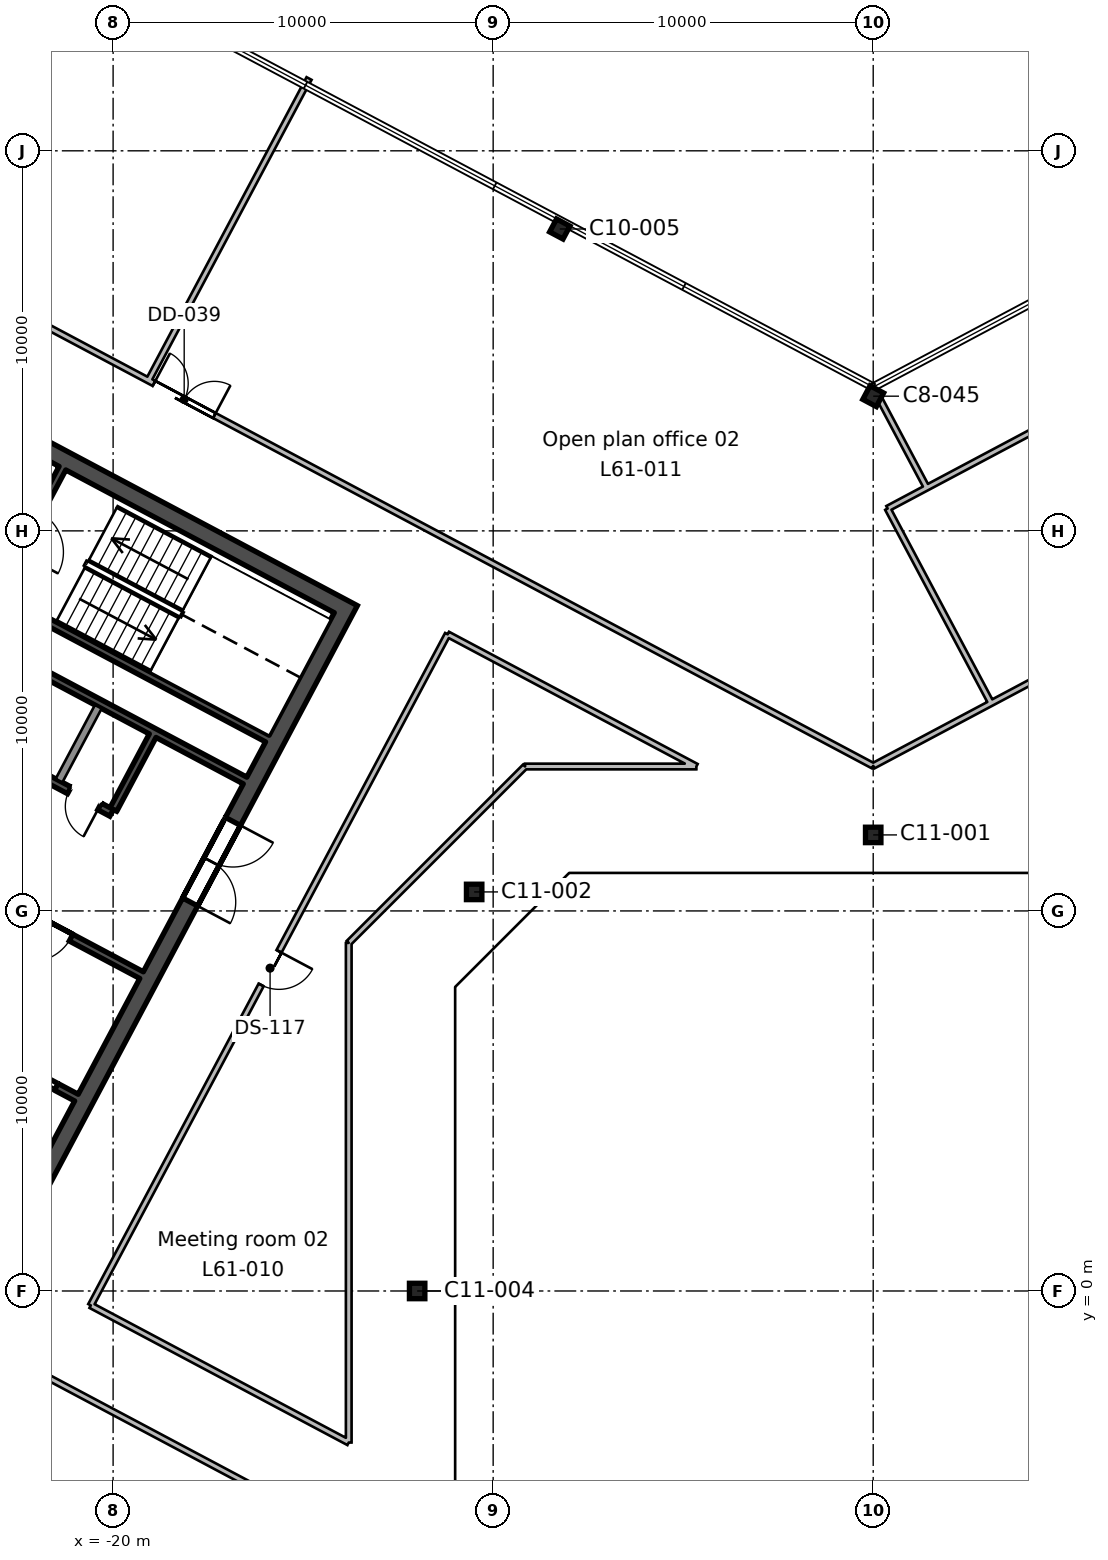
"""IFC4 building model, lengths in metres.
Left out: names, types, materials, properties, quantities, classifications, styles, units other than length and angle.
Written with IfcOpenShell. Run it as: python <this file> out.ifc"""

import sys

from ifc_helpers import new_model, si_unit, direction, frame, frame_2d, origin, origin_2d, place, context, subcontext, project, spatial, rectangle, hollow_rectangle, i_section, extrude, element, fill, save


model = new_model("IFC4")
c1 = context("Model", 3, precision=1e-05, world=origin(), true_north=direction((0.0, 1.0)))
c2 = subcontext(c1, "Body", "Model", "MODEL_VIEW")
j1 = project(units=[si_unit("LENGTHUNIT", "METRE"), si_unit("PLANEANGLEUNIT", "RADIAN")], contexts=[c1])
p1 = place(None, origin())
s1 = spatial("IfcSite", under=j1, at=p1, CompositionType="ELEMENT")
p2 = place(p1, origin())
s2 = spatial("IfcBuilding", under=s1, at=p2, CompositionType="ELEMENT")
p3 = place(p2, frame((0.0, 0.0, 273.6)))
s3 = spatial("IfcBuildingStorey", under=s2, at=p3, CompositionType="ELEMENT", Elevation=273.6)
for number, where, z_axis, x_axis in (
    (1, (-12.0, 0.0, 0.0), (0.0, 0.0, 1.0), (1.0, 0.0, 0.0)),
    (2, (-10.5, 10.5, 0.0), (0.0, 0.0, 1.0), (1.0, 0.0, 0.0)),
    (3, (0.0, 12.0, 0.0), (0.0, 0.0, 1.0), (1.0, 0.0, 0.0)),
):
    element("IfcColumn", number, at=place(p3, frame(where, z_axis=z_axis, x_axis=x_axis)), inside=s3, PredefinedType="COLUMN", context=c2, shape_type="SweptSolid", body=[
        extrude(hollow_rectangle(XDim=0.406, YDim=0.406, WallThickness=0.009, InnerFilletRadius=0.004, OuterFilletRadius=0.013, at=origin_2d()), origin(), (0.0, 0.0, 1.0), 3.9),
    ])
p4 = place(p3, frame((0.0, 23.544, 0.0), z_axis=(0.0, 0.0, 1.0), x_axis=(-0.882947592859, 0.469471562786, 0.0)))
e4 = element("IfcColumn", 4, at=p4, inside=s3, PredefinedType="COLUMN", context=c2, shape_type="SweptSolid", body=[
    extrude(i_section(OverallWidth=0.404, OverallDepth=0.406, WebThickness=0.027, FlangeThickness=0.044, FilletRadius=0.015, at=origin_2d()), origin(), (0.0, 0.0, 1.0), 3.9),
])
p5 = place(p3, frame((-8.247, 27.943, 0.0), z_axis=(0.0, 0.0, 1.0), x_axis=(-0.882947592859, 0.469471562786, 0.0)))
e5 = element("IfcColumn", 5, at=p5, inside=s3, PredefinedType="COLUMN", context=c2, shape_type="SweptSolid", body=[
    extrude(i_section(OverallWidth=0.399, OverallDepth=0.386, WebThickness=0.021, FlangeThickness=0.033, FilletRadius=0.015, at=origin_2d()), origin(), (0.0, 0.0, 1.0), 3.9),
])
p6 = place(p3, frame((-13.771, 18.138, 0.0), z_axis=(0.0, 0.0, 1.0), x_axis=(-0.469467968382, -0.882949504028, 0.0)))
e6 = element("IfcWall", 6, at=p6, inside=s3, PredefinedType="SHEAR", context=c2, shape_type="SweptSolid", body=[
    extrude(rectangle(XDim=19.1, YDim=0.45, at=frame_2d((9.55, 0.0))), origin(), (0.0, 0.0, 1.0), 3.9),
])
p7 = place(p6, frame((6.55, 0.0, 0.0)))
e7 = element("IfcOpeningElement", 7, at=p7, cuts=e6, PredefinedType="OPENING", context=c2, shape_type="SweptSolid", body=[
    extrude(rectangle(XDim=2.4, YDim=2.4, at=frame_2d((1.2, 1.2))), frame((0.0, 0.235, 0.0), z_axis=(0.0, -1.0, 0.0), x_axis=(1.0, 0.0, 0.0)), (0.0, 0.0, 1.0), 0.47),
])
p8 = place(p3, frame((-14.076, 18.045, 0.0), z_axis=(0.0, 0.0, 1.0), x_axis=(-0.882947755831, 0.46947125628, 0.0)))
e8 = element("IfcWall", 8, at=p8, inside=s3, PredefinedType="SHEAR", context=c2, shape_type="SweptSolid", body=[
    extrude(rectangle(XDim=20.2, YDim=0.45, at=frame_2d((10.1, 0.0))), origin(), (0.0, 0.0, 1.0), 3.9),
])
p9 = place(p3, frame((-18.96, 14.611, 0.0), z_axis=(0.0, 0.0, 1.0), x_axis=(-0.4694473164, -0.882960484464, 0.0)))
e9 = element("IfcWall", 9, at=p9, inside=s3, PredefinedType="SHEAR", context=c2, shape_type="SweptSolid", body=[
    extrude(rectangle(XDim=2.2, YDim=0.2, at=frame_2d((1.1, 0.0))), origin(), (0.0, 0.0, 1.0), 3.9),
])
p10 = place(p3, frame((-20.39, 15.372, 0.0), z_axis=(0.0, 0.0, 1.0), x_axis=(-0.4694473164, -0.882960484464, 0.0)))
e10 = element("IfcWall", 10, at=p10, inside=s3, PredefinedType="SOLIDWALL", context=c2, shape_type="SweptSolid", body=[
    extrude(rectangle(XDim=2.2, YDim=0.2, at=frame_2d((1.1, 0.0))), origin(), (0.0, 0.0, 1.0), 3.9),
])
p11 = place(p3, frame((-21.333, 21.649, 0.0), z_axis=(0.0, 0.0, 1.0), x_axis=(-0.469494272526, -0.882935517501, 0.0)))
e11 = element("IfcWall", 11, at=p11, inside=s3, PredefinedType="SHEAR", context=c2, shape_type="SweptSolid", body=[
    extrude(rectangle(XDim=7.3, YDim=0.2, at=frame_2d((3.65, 0.0))), origin(), (0.0, 0.0, 1.0), 3.9),
])
p12 = place(p11, frame((1.3, 0.0, 0.0)))
e12 = element("IfcOpeningElement", 12, at=p12, cuts=e11, PredefinedType="OPENING", context=c2, shape_type="SweptSolid", body=[
    extrude(rectangle(XDim=1.2, YDim=2.1, at=frame_2d((0.6, 1.05))), frame((0.0, 0.11, 0.0), z_axis=(0.0, -1.0, 0.0), x_axis=(1.0, 0.0, 0.0)), (0.0, 0.0, 1.0), 0.22),
])
p13 = place(p3, frame((-15.942, 14.536, 0.0), z_axis=(0.0, 0.0, 1.0), x_axis=(-0.882946947542, 0.469472776449, 0.0)))
e13 = element("IfcWall", 13, at=p13, inside=s3, PredefinedType="SHEAR", context=c2, shape_type="SweptSolid", body=[
    extrude(rectangle(XDim=8.0, YDim=0.2, at=frame_2d((4.0, 0.0))), origin(), (0.0, 0.0, 1.0), 3.9),
])
p14 = place(p3, frame((-16.529, 13.432, 0.0), z_axis=(0.0, 0.0, 1.0), x_axis=(-0.88295287151, 0.469461634952, 0.0)))
e14 = element("IfcWall", 14, at=p14, inside=s3, PredefinedType="SHEAR", context=c2, shape_type="SweptSolid", body=[
    extrude(rectangle(XDim=8.0, YDim=0.2, at=frame_2d((4.0, 0.0))), origin(), (0.0, 0.0, 1.0), 3.9),
])
p15 = place(p3, frame((-20.04, 12.581, 0.0), z_axis=(0.0, 0.0, 1.0), x_axis=(-0.882942972946, 0.469480251476, 0.0)))
e15 = element("IfcWall", 15, at=p15, inside=s3, PredefinedType="SHEAR", context=c2, shape_type="SweptSolid", body=[
    extrude(rectangle(XDim=5.4, YDim=0.2, at=frame_2d((2.7, 0.0))), origin(), (0.0, 0.0, 1.0), 3.9),
])
p16 = place(p15, frame((0.36, 0.0, 0.0)))
e16 = element("IfcOpeningElement", 16, at=p16, cuts=e15, PredefinedType="OPENING", context=c2, shape_type="SweptSolid", body=[
    extrude(rectangle(XDim=0.9, YDim=2.1, at=frame_2d((0.45, 1.05))), frame((0.0, 0.11, 0.0), z_axis=(0.0, -1.0, 0.0), x_axis=(1.0, 0.0, 0.0)), (0.0, 0.0, 1.0), 0.22),
])
p17 = place(p15, frame((3.06, 0.0, 0.0)))
e17 = element("IfcOpeningElement", 17, at=p17, cuts=e15, PredefinedType="OPENING", context=c2, shape_type="SweptSolid", body=[
    extrude(rectangle(XDim=0.9, YDim=2.1, at=frame_2d((0.45, 1.05))), frame((0.0, 0.11, 0.0), z_axis=(0.0, -1.0, 0.0), x_axis=(1.0, 0.0, 0.0)), (0.0, 0.0, 1.0), 0.22),
])
p18 = place(p3, frame((-19.252, 8.311, 0.0), z_axis=(0.0, 0.0, 1.0), x_axis=(-0.882955722218, 0.469456273365, 0.0)))
e18 = element("IfcWall", 18, at=p18, inside=s3, PredefinedType="SHEAR", context=c2, shape_type="SweptSolid", body=[
    extrude(rectangle(XDim=10.0, YDim=0.2, at=frame_2d((5.0, 0.0))), origin(), (0.0, 0.0, 1.0), 3.9),
])
p19 = place(p18, frame((2.1, 0.0, 0.0)))
e19 = element("IfcOpeningElement", 19, at=p19, cuts=e18, PredefinedType="OPENING", context=c2, shape_type="SweptSolid", body=[
    extrude(rectangle(XDim=1.2, YDim=2.1, at=frame_2d((0.6, 1.05))), frame((0.0, 0.11, 0.0), z_axis=(0.0, -1.0, 0.0), x_axis=(1.0, 0.0, 0.0)), (0.0, 0.0, 1.0), 0.22),
])
p20 = place(p18, frame((5.4, 0.0, 0.0)))
e20 = element("IfcOpeningElement", 20, at=p20, cuts=e18, PredefinedType="OPENING", context=c2, shape_type="SweptSolid", body=[
    extrude(rectangle(XDim=1.1, YDim=2.1, at=frame_2d((0.55, 1.05))), frame((0.0, 0.11, 0.0), z_axis=(0.0, -1.0, 0.0), x_axis=(1.0, 0.0, 0.0)), (0.0, 0.0, 1.0), 0.22),
])
p21 = place(p18, frame((8.1, 0.0, 0.0)))
e21 = element("IfcOpeningElement", 21, at=p21, cuts=e18, PredefinedType="OPENING", context=c2, shape_type="SweptSolid", body=[
    extrude(rectangle(XDim=1.1, YDim=2.1, at=frame_2d((0.55, 1.05))), frame((0.0, 0.11, 0.0), z_axis=(0.0, -1.0, 0.0), x_axis=(1.0, 0.0, 0.0)), (0.0, 0.0, 1.0), 0.22),
])
p22 = place(p3, frame((-20.965, 5.088, 0.0), z_axis=(0.0, 0.0, 1.0), x_axis=(-0.882925986334, 0.469512196493, 0.0)))
e22 = element("IfcWall", 22, at=p22, inside=s3, PredefinedType="SHEAR", context=c2, shape_type="SweptSolid", body=[
    extrude(rectangle(XDim=4.5, YDim=0.2, at=frame_2d((2.25, 0.0))), origin(), (0.0, 0.0, 1.0), 3.9),
])
p23 = place(p22, frame((0.6, 0.0, 0.0)))
e23 = element("IfcOpeningElement", 23, at=p23, cuts=e22, PredefinedType="OPENING", context=c2, shape_type="SweptSolid", body=[
    extrude(rectangle(XDim=1.1, YDim=2.1, at=frame_2d((0.55, 1.05))), frame((0.0, 0.11, 0.0), z_axis=(0.0, -1.0, 0.0), x_axis=(1.0, 0.0, 0.0)), (0.0, 0.0, 1.0), 0.22),
])
p24 = place(p3, frame((-48.812, 39.771, 0.0), z_axis=(0.0, 0.0, 1.0), x_axis=(0.882945384259, -0.469475716535, 0.0)))
e24 = element("IfcWall", 24, at=p24, inside=s3, PredefinedType="PARTITIONING", context=c2, shape_type="SweptSolid", body=[
    extrude(rectangle(XDim=55.283, YDim=0.15, at=frame_2d((27.642, 0.0))), origin(), (0.0, 0.0, 1.0), 3.54),
])
p25 = place(p24, frame((33.85, 0.0, 0.0)))
e25 = element("IfcOpeningElement", 25, at=p25, cuts=e24, PredefinedType="OPENING", context=c2, shape_type="SweptSolid", body=[
    extrude(rectangle(XDim=1.8, YDim=2.1, at=frame_2d((0.9, 1.05))), frame((0.0, 0.085, 0.0), z_axis=(0.0, -1.0, 0.0), x_axis=(1.0, 0.0, 0.0)), (0.0, 0.0, 1.0), 0.17),
])
p26 = place(p24, frame((27.15, 0.0, 0.0)))
e26 = element("IfcOpeningElement", 26, at=p26, cuts=e24, PredefinedType="OPENING", context=c2, shape_type="SweptSolid", body=[
    extrude(rectangle(XDim=1.0, YDim=2.1, at=frame_2d((0.5, 1.05))), frame((0.0, 0.085, 0.0), z_axis=(0.0, -1.0, 0.0), x_axis=(1.0, 0.0, 0.0)), (0.0, 0.0, 1.0), 0.17),
])
p27 = place(p24, frame((15.55, 0.0, 0.0)))
e27 = element("IfcOpeningElement", 27, at=p27, cuts=e24, PredefinedType="OPENING", context=c2, shape_type="SweptSolid", body=[
    extrude(rectangle(XDim=1.0, YDim=2.1, at=frame_2d((0.5, 1.05))), frame((0.0, 0.085, 0.0), z_axis=(0.0, -1.0, 0.0), x_axis=(1.0, 0.0, 0.0)), (0.0, 0.0, 1.0), 0.17),
])
p28 = place(p3, frame((0.0, 13.817, 0.0), z_axis=(0.0, 0.0, 1.0), x_axis=(0.882939200239, 0.469487346668, 0.0)))
e28 = element("IfcWall", 28, at=p28, inside=s3, PredefinedType="PARTITIONING", context=c2, shape_type="SweptSolid", body=[
    extrude(rectangle(XDim=33.714, YDim=0.15, at=frame_2d((16.857, 0.0))), origin(), (0.0, 0.0, 1.0), 3.54),
])
p29 = place(p28, frame((15.95, 0.0, 0.0)))
e29 = element("IfcOpeningElement", 29, at=p29, cuts=e28, PredefinedType="OPENING", context=c2, shape_type="SweptSolid", body=[
    extrude(rectangle(XDim=1.8, YDim=2.1, at=frame_2d((0.9, 1.05))), frame((0.0, 0.085, 0.0), z_axis=(0.0, -1.0, 0.0), x_axis=(1.0, 0.0, 0.0)), (0.0, 0.0, 1.0), 0.17),
])
p30 = place(p3, frame((-13.8, -6.48, 0.0), z_axis=(0.0, 0.0, 1.0), x_axis=(-0.882943991273, 0.469478336322, 0.0)))
e30 = element("IfcWall", 30, at=p30, inside=s3, PredefinedType="PARTITIONING", context=c2, shape_type="SweptSolid", body=[
    extrude(rectangle(XDim=36.33, YDim=0.15, at=frame_2d((18.165, 0.0))), origin(), (0.0, 0.0, 1.0), 3.54),
])
p31 = place(p30, frame((20.15, 0.0, 0.0)))
e31 = element("IfcOpeningElement", 31, at=p31, cuts=e30, PredefinedType="OPENING", context=c2, shape_type="SweptSolid", body=[
    extrude(rectangle(XDim=1.0, YDim=2.1, at=frame_2d((0.5, 1.05))), frame((0.0, 0.085, 0.0), z_axis=(0.0, -1.0, 0.0), x_axis=(1.0, 0.0, 0.0)), (0.0, 0.0, 1.0), 0.17),
])
p32 = place(p30, frame((17.25, 0.0, 0.0)))
e32 = element("IfcOpeningElement", 32, at=p32, cuts=e30, PredefinedType="OPENING", context=c2, shape_type="SweptSolid", body=[
    extrude(rectangle(XDim=1.8, YDim=2.1, at=frame_2d((0.9, 1.05))), frame((0.0, 0.085, 0.0), z_axis=(0.0, -1.0, 0.0), x_axis=(1.0, 0.0, 0.0)), (0.0, 0.0, 1.0), 0.17),
])
p33 = place(p3, frame((-14.844, 31.903, 0.0), z_axis=(0.0, 0.0, 1.0), x_axis=(-0.469351570135, -0.883011383625, 0.0)))
e33 = element("IfcWall", 33, at=p33, inside=s3, PredefinedType="PARTITIONING", context=c2, shape_type="SweptSolid", body=[
    extrude(rectangle(XDim=9.0, YDim=0.15, at=frame_2d((4.5, 0.0))), origin(), (0.0, 0.0, 1.0), 3.54),
])
p34 = place(p3, frame((2.451, 16.691, 0.0), z_axis=(0.0, 0.0, 1.0), x_axis=(0.46968306716, -0.88283510149, 0.0)))
e34 = element("IfcWall", 34, at=p34, inside=s3, PredefinedType="PARTITIONING", context=c2, shape_type="SweptSolid", body=[
    extrude(rectangle(XDim=1.386, YDim=0.15, at=frame_2d((0.693, 0.0))), origin(), (0.0, 0.0, 1.0), 3.54),
])
p35 = place(p3, frame((0.179, 23.45, 0.0), z_axis=(0.0, 0.0, 1.0), x_axis=(0.469205161074, -0.883089189619, 0.0)))
e35 = element("IfcWall", 35, at=p35, inside=s3, PredefinedType="PARTITIONING", context=c2, shape_type="SweptSolid", body=[
    extrude(rectangle(XDim=2.621, YDim=0.15, at=frame_2d((1.311, 0.0))), origin(), (0.0, 0.0, 1.0), 3.54),
])
p36 = place(p3, frame((1.405, 21.133, 0.0), z_axis=(0.0, 0.0, 1.0), x_axis=(0.882954791134, 0.469458024549, 0.0)))
e36 = element("IfcWall", 36, at=p36, inside=s3, PredefinedType="PARTITIONING", context=c2, shape_type="SweptSolid", body=[
    extrude(rectangle(XDim=20.67, YDim=0.15, at=frame_2d((10.335, 0.0))), origin(), (0.0, 0.0, 1.0), 3.54),
])
p37 = place(p3, frame((2.451, 16.691, 0.0), z_axis=(0.0, 0.0, 1.0), x_axis=(-0.469465268903, 0.882950939347, 0.0)))
e37 = element("IfcWall", 37, at=p37, inside=s3, PredefinedType="PARTITIONING", context=c2, shape_type="SweptSolid", body=[
    extrude(rectangle(XDim=4.414, YDim=0.15, at=frame_2d((2.207, 0.0))), origin(), (0.0, 0.0, 1.0), 3.54),
])
p38 = place(p3, frame((1.405, 21.133, 0.0), z_axis=(0.0, 0.0, 1.0), x_axis=(-0.882753784089, -0.469835882704, 0.0)))
e38 = element("IfcWall", 38, at=p38, inside=s3, PredefinedType="PARTITIONING", context=c2, shape_type="SweptSolid", body=[
    extrude(rectangle(XDim=1.162, YDim=0.15, at=frame_2d((0.581, 0.0))), origin(), (0.0, 0.0, 1.0), 3.54),
])
p39 = place(p3, frame((-20.588, -0.379, 0.0), z_axis=(0.0, 0.0, 1.0), x_axis=(0.469489882812, 0.882937851685, 0.0)))
e39 = element("IfcWall", 39, at=p39, inside=s3, PredefinedType="PARTITIONING", context=c2, shape_type="SweptSolid", body=[
    extrude(rectangle(XDim=20.0, YDim=0.15, at=frame_2d((10.0, 0.0))), origin(), (0.0, 0.0, 1.0), 3.54),
])
p40 = place(p39, frame((9.55, 0.0, 0.0)))
e40 = element("IfcOpeningElement", 40, at=p40, cuts=e39, PredefinedType="OPENING", context=c2, shape_type="SweptSolid", body=[
    extrude(rectangle(XDim=1.0, YDim=2.1, at=frame_2d((0.5, 1.05))), frame((0.0, 0.085, 0.0), z_axis=(0.0, -1.0, 0.0), x_axis=(1.0, 0.0, 0.0)), (0.0, 0.0, 1.0), 0.17),
])
p41 = place(p3, frame((-11.198, 17.28, 0.0), z_axis=(0.0, 0.0, 1.0), x_axis=(0.88294849999, -0.469469856717, 0.0)))
e41 = element("IfcWall", 41, at=p41, inside=s3, PredefinedType="PARTITIONING", context=c2, shape_type="SweptSolid", body=[
    extrude(rectangle(XDim=7.413, YDim=0.15, at=frame_2d((3.706, 0.0))), origin(), (0.0, 0.0, 1.0), 3.54),
])
p42 = place(p3, frame((-4.653, 13.8, 0.0), z_axis=(0.0, 0.0, 1.0), x_axis=(-1.0, 0.0, 0.0)))
e42 = element("IfcWall", 42, at=p42, inside=s3, PredefinedType="PARTITIONING", context=c2, shape_type="SweptSolid", body=[
    extrude(rectangle(XDim=4.507, YDim=0.15, at=frame_2d((2.253, 0.0))), origin(), (0.0, 0.0, 1.0), 3.54),
])
p43 = place(p3, frame((-9.16, 13.8, 0.0), z_axis=(0.0, 0.0, 1.0), x_axis=(-0.707106781187, -0.707106781187, 0.0)))
e43 = element("IfcWall", 43, at=p43, inside=s3, PredefinedType="PARTITIONING", context=c2, shape_type="SweptSolid", body=[
    extrude(rectangle(XDim=6.562, YDim=0.15, at=frame_2d((3.281, 0.0))), origin(), (0.0, 0.0, 1.0), 3.54),
])
p44 = place(p3, frame((-13.8, 9.16, 0.0), z_axis=(0.0, 0.0, 1.0), x_axis=(0.0, -1.0, 0.0)))
e44 = element("IfcWall", 44, at=p44, inside=s3, PredefinedType="PARTITIONING", context=c2, shape_type="SweptSolid", body=[
    extrude(rectangle(XDim=13.148, YDim=0.15, at=frame_2d((6.574, 0.0))), origin(), (0.0, 0.0, 1.0), 3.54),
])
p45 = place(p3, frame((-13.8, -3.988, 0.0), z_axis=(0.0, 0.0, 1.0), x_axis=(-0.882949137368, 0.469468657976, 0.0)))
e45 = element("IfcWall", 45, at=p45, inside=s3, PredefinedType="PARTITIONING", context=c2, shape_type="SweptSolid", body=[
    extrude(rectangle(XDim=7.688, YDim=0.15, at=frame_2d((3.844, 0.0))), origin(), (0.0, 0.0, 1.0), 3.54),
])
p46 = place(p7, origin())
e46 = element("IfcDoor", 46, at=p46, inside=s3, OperationType="DOUBLE_DOOR_SINGLE_SWING", PredefinedType="DOOR", context=c2, shape_type="SweptSolid", body=[
    extrude(rectangle(XDim=2.4, YDim=2.4, at=frame_2d((1.2, 1.2))), frame((0.0, 0.025, 0.0), z_axis=(0.0, -1.0, 0.0), x_axis=(1.0, 0.0, 0.0)), (0.0, 0.0, 1.0), 0.05),
])
fill(e7, e46)
p47 = place(p19, origin())
e47 = element("IfcDoor", 47, at=p47, inside=s3, OperationType="SINGLE_SWING_RIGHT", PredefinedType="DOOR", context=c2, shape_type="SweptSolid", body=[
    extrude(rectangle(XDim=1.2, YDim=2.1, at=frame_2d((0.6, 1.05))), frame((0.0, 0.025, 0.0), z_axis=(0.0, -1.0, 0.0), x_axis=(1.0, 0.0, 0.0)), (0.0, 0.0, 1.0), 0.05),
])
fill(e19, e47)
p48 = place(p16, origin())
e48 = element("IfcDoor", 48, at=p48, inside=s3, OperationType="SINGLE_SWING_LEFT", PredefinedType="DOOR", context=c2, shape_type="SweptSolid", body=[
    extrude(rectangle(XDim=0.9, YDim=2.1, at=frame_2d((0.45, 1.05))), frame((0.0, 0.025, 0.0), z_axis=(0.0, -1.0, 0.0), x_axis=(1.0, 0.0, 0.0)), (0.0, 0.0, 1.0), 0.05),
])
fill(e16, e48)
p49 = place(p23, origin())
e49 = element("IfcDoor", 49, at=p49, inside=s3, OperationType="DOUBLE_DOOR_SLIDING", PredefinedType="DOOR", context=c2, shape_type="SweptSolid", body=[
    extrude(rectangle(XDim=1.1, YDim=2.1, at=frame_2d((0.55, 1.05))), frame((0.0, 0.025, 0.0), z_axis=(0.0, -1.0, 0.0), x_axis=(1.0, 0.0, 0.0)), (0.0, 0.0, 1.0), 0.05),
])
fill(e23, e49)
p50 = place(p40, frame((1.0, 0.0, 0.0), z_axis=(0.0, 0.0, 1.0), x_axis=(-1.0, 0.0, 0.0)))
e50 = element("IfcDoor", 50, at=p50, inside=s3, OperationType="SINGLE_SWING_LEFT", PredefinedType="DOOR", context=c2, shape_type="SweptSolid", body=[
    extrude(rectangle(XDim=1.0, YDim=2.1, at=frame_2d((0.5, 1.05))), frame((0.0, 0.025, 0.0), z_axis=(0.0, -1.0, 0.0), x_axis=(1.0, 0.0, 0.0)), (0.0, 0.0, 1.0), 0.05),
])
fill(e40, e50)
p51 = place(p25, origin())
e51 = element("IfcDoor", 51, at=p51, inside=s3, OperationType="DOUBLE_DOOR_SINGLE_SWING", PredefinedType="DOOR", context=c2, shape_type="SweptSolid", body=[
    extrude(rectangle(XDim=1.8, YDim=2.1, at=frame_2d((0.9, 1.05))), frame((0.0, 0.025, 0.0), z_axis=(0.0, -1.0, 0.0), x_axis=(1.0, 0.0, 0.0)), (0.0, 0.0, 1.0), 0.05),
])
fill(e25, e51)
save(model, sys.argv[1])
